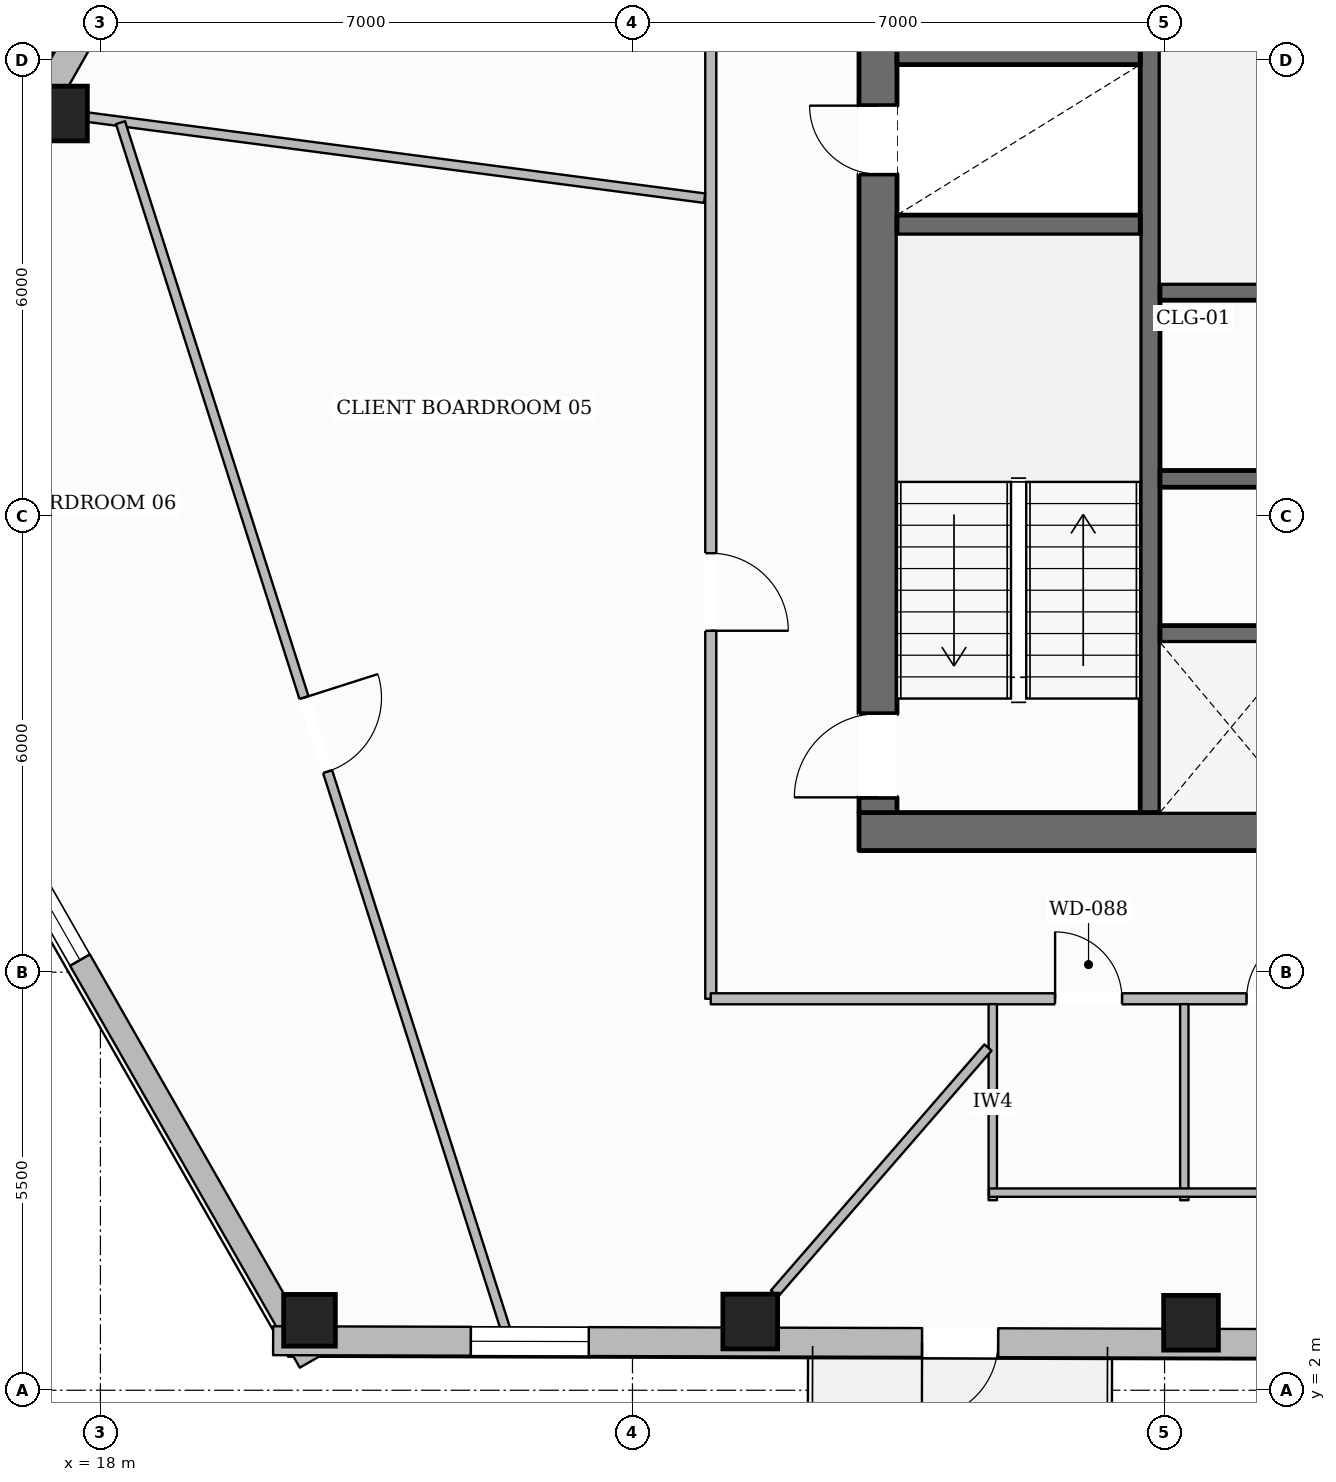
"""IFC4 building model, lengths in metres.
Left out: names, types, materials, properties, quantities, classifications, styles, units other than length and angle.
Written with IfcOpenShell. Run it as: python <this file> out.ifc"""

import sys

from ifc_helpers import new_model, si_unit, direction, frame, frame_2d, origin, origin_2d, place, context, subcontext, project, spatial, rectangle, hollow_rectangle, extrude, element, fill, save


model = new_model("IFC4")
c1 = context("Model", 3, precision=1e-05, world=origin(), true_north=direction((0.0, 1.0)))
c2 = subcontext(c1, "Body", "Model", "MODEL_VIEW")
j1 = project(units=[si_unit("LENGTHUNIT", "METRE"), si_unit("PLANEANGLEUNIT", "RADIAN")], contexts=[c1])
p1 = place(None, origin())
s1 = spatial("IfcSite", under=j1, at=p1, CompositionType="ELEMENT")
p2 = place(p1, origin())
s2 = spatial("IfcBuilding", under=s1, at=p2, CompositionType="ELEMENT")
p3 = place(p2, frame((0.0, 0.0, 97.05)))
s3 = spatial("IfcBuildingStorey", under=s2, at=p3, CompositionType="ELEMENT", Elevation=97.05)
p4 = place(p3, frame((27.98, 9.35, 0.0), z_axis=(0.0, 0.0, 1.0), x_axis=(1.0, 0.0, 0.0)))
e1 = element("IfcWall", 1, at=p4, inside=s3, PredefinedType="SOLIDWALL", context=c2, shape_type="SweptSolid", body=[
    extrude(rectangle(XDim=20.04, YDim=0.5, at=frame_2d((10.02, 0.0))), origin(), (0.0, 0.0, 1.0), 3.6),
])
p5 = place(p4, frame((10.52, 0.0, 0.0)))
e2 = element("IfcOpeningElement", 2, at=p5, cuts=e1, PredefinedType="OPENING", context=c2, shape_type="SweptSolid", body=[
    extrude(rectangle(XDim=1.4, YDim=2.2, at=frame_2d((0.7, 1.1))), frame((0.0, 0.26, 0.0), z_axis=(0.0, -1.0, 0.0), x_axis=(1.0, 0.0, 0.0)), (0.0, 0.0, 1.0), 0.52),
])
p6 = place(p3, frame((28.23, 9.6, 0.0), z_axis=(0.0, 0.0, 1.0), x_axis=(0.0, 1.0, 0.0)))
e3 = element("IfcWall", 3, at=p6, inside=s3, PredefinedType="SOLIDWALL", context=c2, shape_type="SweptSolid", body=[
    extrude(rectangle(XDim=13.0, YDim=0.5, at=frame_2d((6.5, 0.0))), origin(), (0.0, 0.0, 1.0), 3.6),
])
p7 = place(p6, frame((0.2, 0.0, 0.0)))
e4 = element("IfcOpeningElement", 4, at=p7, cuts=e3, PredefinedType="OPENING", context=c2, shape_type="SweptSolid", body=[
    extrude(rectangle(XDim=1.1, YDim=2.15, at=frame_2d((0.55, 1.075))), frame((0.0, 0.26, 0.0), z_axis=(0.0, -1.0, 0.0), x_axis=(1.0, 0.0, 0.0)), (0.0, 0.0, 1.0), 0.52),
])
p8 = place(p6, frame((8.4, 0.0, 0.0)))
e5 = element("IfcOpeningElement", 5, at=p8, cuts=e3, PredefinedType="OPENING", context=c2, shape_type="SweptSolid", body=[
    extrude(rectangle(XDim=0.9, YDim=2.1, at=frame_2d((0.45, 1.05))), frame((0.0, 0.26, 0.0), z_axis=(0.0, -1.0, 0.0), x_axis=(1.0, 0.0, 0.0)), (0.0, 0.0, 1.0), 0.52),
])
p9 = place(p3, frame((31.81, 9.6, 0.0), z_axis=(0.0, 0.0, 1.0), x_axis=(0.0, 1.0, 0.0)))
e6 = element("IfcWall", 6, at=p9, inside=s3, PredefinedType="SHEAR", context=c2, shape_type="SweptSolid", body=[
    extrude(rectangle(XDim=13.0, YDim=0.26, at=frame_2d((6.5, 0.0))), origin(), (0.0, 0.0, 1.0), 3.6),
])
p10 = place(p9, frame((10.925, 0.0, 0.0)))
e7 = element("IfcOpeningElement", 7, at=p10, cuts=e6, PredefinedType="OPENING", context=c2, shape_type="SweptSolid", body=[
    extrude(rectangle(XDim=1.25, YDim=2.25, at=frame_2d((0.625, 1.125))), frame((0.0, 0.14, 0.0), z_axis=(0.0, -1.0, 0.0), x_axis=(1.0, 0.0, 0.0)), (0.0, 0.0, 1.0), 0.28),
])
for number, where, z_axis, x_axis in (
    (8, (28.48, 17.33, 0.0), (0.0, 0.0, 1.0), (1.0, 0.0, 0.0)),
    (9, (28.48, 19.57, 0.0), (0.0, 0.0, 1.0), (1.0, 0.0, 0.0)),
):
    element("IfcWall", number, at=place(p3, frame(where, z_axis=z_axis, x_axis=x_axis)), inside=s3, PredefinedType="SHEAR", context=c2, shape_type="SweptSolid", body=[
        extrude(rectangle(XDim=3.2, YDim=0.26, at=frame_2d((1.6, 0.0))), origin(), (0.0, 0.0, 1.0), 3.6),
    ])
p11 = place(p3, frame((31.94, 16.45, 0.0), z_axis=(0.0, 0.0, 1.0), x_axis=(1.0, 0.0, 0.0)))
e10 = element("IfcWall", 10, at=p11, inside=s3, PredefinedType="SOLIDWALL", context=c2, shape_type="SweptSolid", body=[
    extrude(rectangle(XDim=12.12, YDim=0.22, at=frame_2d((6.06, 0.0))), origin(), (0.0, 0.0, 1.0), 3.6),
])
p12 = place(p3, frame((31.94, 13.99, 0.0), z_axis=(0.0, 0.0, 1.0), x_axis=(1.0, 0.0, 0.0)))
e11 = element("IfcWall", 11, at=p12, inside=s3, PredefinedType="SOLIDWALL", context=c2, shape_type="SweptSolid", body=[
    extrude(rectangle(XDim=12.12, YDim=0.22, at=frame_2d((6.06, 0.0))), origin(), (0.0, 0.0, 1.0), 3.6),
])
p13 = place(p12, frame((2.51, 0.0, 0.0)))
e12 = element("IfcOpeningElement", 12, at=p13, cuts=e11, PredefinedType="OPENING", context=c2, shape_type="SweptSolid", body=[
    extrude(rectangle(XDim=0.9, YDim=2.1, at=frame_2d((0.45, 1.05))), frame((0.0, 0.12, 0.0), z_axis=(0.0, -1.0, 0.0), x_axis=(1.0, 0.0, 0.0)), (0.0, 0.0, 1.0), 0.24),
])
p14 = place(p12, frame((6.535, 0.0, 0.0)))
e13 = element("IfcOpeningElement", 13, at=p14, cuts=e11, PredefinedType="OPENING", context=c2, shape_type="SweptSolid", body=[
    extrude(rectangle(XDim=1.1, YDim=2.2, at=frame_2d((0.55, 1.1))), frame((0.0, 0.12, 0.0), z_axis=(0.0, -1.0, 0.0), x_axis=(1.0, 0.0, 0.0)), (0.0, 0.0, 1.0), 0.24),
])
p15 = place(p12, frame((8.585, 0.0, 0.0)))
e14 = element("IfcOpeningElement", 14, at=p15, cuts=e11, PredefinedType="OPENING", context=c2, shape_type="SweptSolid", body=[
    extrude(rectangle(XDim=1.1, YDim=2.2, at=frame_2d((0.55, 1.1))), frame((0.0, 0.12, 0.0), z_axis=(0.0, -1.0, 0.0), x_axis=(1.0, 0.0, 0.0)), (0.0, 0.0, 1.0), 0.24),
])
p16 = place(p12, frame((10.635, 0.0, 0.0)))
e15 = element("IfcOpeningElement", 15, at=p16, cuts=e11, PredefinedType="OPENING", context=c2, shape_type="SweptSolid", body=[
    extrude(rectangle(XDim=1.1, YDim=2.2, at=frame_2d((0.55, 1.1))), frame((0.0, 0.12, 0.0), z_axis=(0.0, -1.0, 0.0), x_axis=(1.0, 0.0, 0.0)), (0.0, 0.0, 1.0), 0.24),
])
p17 = place(p3, frame((31.94, 11.95, 0.0), z_axis=(0.0, 0.0, 1.0), x_axis=(1.0, 0.0, 0.0)))
e16 = element("IfcWall", 16, at=p17, inside=s3, PredefinedType="SOLIDWALL", context=c2, shape_type="SweptSolid", body=[
    extrude(rectangle(XDim=6.19, YDim=0.22, at=frame_2d((3.095, 0.0))), origin(), (0.0, 0.0, 1.0), 3.6),
])
p18 = place(p3, frame((17.468, 18.796, 0.0), z_axis=(0.0, 0.0, 1.0), x_axis=(1.0, 0.0, 0.0)))
e17 = element("IfcColumn", 17, at=p18, inside=s3, PredefinedType="COLUMN", context=c2, shape_type="SweptSolid", body=[
    extrude(hollow_rectangle(XDim=0.72, YDim=0.72, WallThickness=0.032, at=origin_2d()), origin(), (0.0, 0.0, 1.0), 3.6),
])
p19 = place(p3, frame((20.751, 2.92, 0.0), z_axis=(0.0, 0.0, 1.0), x_axis=(1.0, 0.0, 0.0)))
e18 = element("IfcColumn", 18, at=p19, inside=s3, PredefinedType="COLUMN", context=c2, shape_type="SweptSolid", body=[
    extrude(hollow_rectangle(XDim=0.68, YDim=0.68, WallThickness=0.03, at=origin_2d()), origin(), (0.0, 0.0, 1.0), 3.6),
])
for number, where, z_axis, x_axis in (
    (19, (26.55, 2.904, 0.0), (0.0, 0.0, 1.0), (1.0, 0.0, 0.0)),
    (20, (32.348, 2.888, 0.0), (0.0, 0.0, 1.0), (1.0, 0.0, 0.0)),
):
    element("IfcColumn", number, at=place(p3, frame(where, z_axis=z_axis, x_axis=x_axis)), inside=s3, PredefinedType="COLUMN", context=c2, shape_type="SweptSolid", body=[
        extrude(hollow_rectangle(XDim=0.72, YDim=0.72, WallThickness=0.032, at=origin_2d()), origin(), (0.0, 0.0, 1.0), 3.6),
    ])
p20 = place(p3, frame((14.113, 13.436, 0.0), z_axis=(0.0, 0.0, 1.0), x_axis=(0.493785476093, 0.869583753068, 0.0)))
e21 = element("IfcWall", 21, at=p20, inside=s3, PredefinedType="STANDARD", context=c2, shape_type="SweptSolid", body=[
    extrude(rectangle(XDim=36.023, YDim=0.38, at=frame_2d((18.011, 0.0))), origin(), (0.0, 0.0, 1.0), 3.059),
])
p21 = place(p20, frame((26.417, 0.0, 0.0)))
e22 = element("IfcOpeningElement", 22, at=p21, cuts=e21, PredefinedType="OPENING", context=c2, shape_type="SweptSolid", body=[
    extrude(rectangle(XDim=1.0, YDim=2.2, at=frame_2d((0.5, 1.1))), frame((0.0, 0.2, 0.0), z_axis=(0.0, -1.0, 0.0), x_axis=(1.0, 0.0, 0.0)), (0.0, 0.0, 1.0), 0.4),
])
p22 = place(p20, frame((31.845, 0.0, 0.65)))
e23 = element("IfcOpeningElement", 23, at=p22, cuts=e21, PredefinedType="OPENING", context=c2, shape_type="SweptSolid", body=[
    extrude(rectangle(XDim=1.55, YDim=1.75, at=frame_2d((0.775, 0.875))), frame((0.0, 0.2, 0.0), z_axis=(0.0, -1.0, 0.0), x_axis=(1.0, 0.0, 0.0)), (0.0, 0.0, 1.0), 0.4),
])
p23 = place(p20, frame((20.156, 0.0, 0.65)))
e24 = element("IfcOpeningElement", 24, at=p23, cuts=e21, PredefinedType="OPENING", context=c2, shape_type="SweptSolid", body=[
    extrude(rectangle(XDim=1.55, YDim=1.75, at=frame_2d((0.775, 0.875))), frame((0.0, 0.2, 0.0), z_axis=(0.0, -1.0, 0.0), x_axis=(1.0, 0.0, 0.0)), (0.0, 0.0, 1.0), 0.4),
])
p24 = place(p20, frame((8.466, 0.0, 0.65)))
e25 = element("IfcOpeningElement", 25, at=p24, cuts=e21, PredefinedType="OPENING", context=c2, shape_type="SweptSolid", body=[
    extrude(rectangle(XDim=1.55, YDim=1.75, at=frame_2d((0.775, 0.875))), frame((0.0, 0.2, 0.0), z_axis=(0.0, -1.0, 0.0), x_axis=(1.0, 0.0, 0.0)), (0.0, 0.0, 1.0), 0.4),
])
p25 = place(p20, frame((2.621, 0.0, 0.65)))
e26 = element("IfcOpeningElement", 26, at=p25, cuts=e21, PredefinedType="OPENING", context=c2, shape_type="SweptSolid", body=[
    extrude(rectangle(XDim=1.55, YDim=1.75, at=frame_2d((0.775, 0.875))), frame((0.0, 0.2, 0.0), z_axis=(0.0, -1.0, 0.0), x_axis=(1.0, 0.0, 0.0)), (0.0, 0.0, 1.0), 0.4),
])
p26 = place(p3, frame((20.753, 2.372, 0.0), z_axis=(0.0, 0.0, 1.0), x_axis=(-0.496215555128, 0.868199356628, 0.0)))
e27 = element("IfcWall", 27, at=p26, inside=s3, PredefinedType="STANDARD", context=c2, shape_type="SweptSolid", body=[
    extrude(rectangle(XDim=13.383, YDim=0.3, at=frame_2d((6.691, 0.0))), origin(), (0.0, 0.0, 1.0), 3.059),
])
p27 = place(p26, frame((6.092, 0.0, 0.65)))
e28 = element("IfcOpeningElement", 28, at=p27, cuts=e27, PredefinedType="OPENING", context=c2, shape_type="SweptSolid", body=[
    extrude(rectangle(XDim=1.2, YDim=1.7, at=frame_2d((0.6, 0.85))), frame((0.0, 0.16, 0.0), z_axis=(0.0, -1.0, 0.0), x_axis=(1.0, 0.0, 0.0)), (0.0, 0.0, 1.0), 0.32),
])
p28 = place(p3, frame((56.023, 2.552, 0.0), z_axis=(0.0, 0.0, 1.0), x_axis=(-0.999996099517, 0.002793018142, 0.0)))
e29 = element("IfcWall", 29, at=p28, inside=s3, PredefinedType="STANDARD", context=c2, shape_type="SweptSolid", body=[
    extrude(rectangle(XDim=35.751, YDim=0.38, at=frame_2d((17.875, 0.0))), origin(), (0.0, 0.0, 1.0), 3.059),
])
p29 = place(p28, frame((26.213, 0.0, 0.0)))
e30 = element("IfcOpeningElement", 30, at=p29, cuts=e29, PredefinedType="OPENING", context=c2, shape_type="SweptSolid", body=[
    extrude(rectangle(XDim=1.0, YDim=2.2, at=frame_2d((0.5, 1.1))), frame((0.0, 0.2, 0.0), z_axis=(0.0, -1.0, 0.0), x_axis=(1.0, 0.0, 0.0)), (0.0, 0.0, 1.0), 0.4),
])
p30 = place(p28, frame((31.599, 0.0, 0.65)))
e31 = element("IfcOpeningElement", 31, at=p30, cuts=e29, PredefinedType="OPENING", context=c2, shape_type="SweptSolid", body=[
    extrude(rectangle(XDim=1.55, YDim=1.75, at=frame_2d((0.775, 0.875))), frame((0.0, 0.2, 0.0), z_axis=(0.0, -1.0, 0.0), x_axis=(1.0, 0.0, 0.0)), (0.0, 0.0, 1.0), 0.4),
])
p31 = place(p28, frame((20.001, 0.0, 0.65)))
e32 = element("IfcOpeningElement", 32, at=p31, cuts=e29, PredefinedType="OPENING", context=c2, shape_type="SweptSolid", body=[
    extrude(rectangle(XDim=1.55, YDim=1.75, at=frame_2d((0.775, 0.875))), frame((0.0, 0.2, 0.0), z_axis=(0.0, -1.0, 0.0), x_axis=(1.0, 0.0, 0.0)), (0.0, 0.0, 1.0), 0.4),
])
p32 = place(p28, frame((8.404, 0.0, 0.65)))
e33 = element("IfcOpeningElement", 33, at=p32, cuts=e29, PredefinedType="OPENING", context=c2, shape_type="SweptSolid", body=[
    extrude(rectangle(XDim=1.55, YDim=1.75, at=frame_2d((0.775, 0.875))), frame((0.0, 0.2, 0.0), z_axis=(0.0, -1.0, 0.0), x_axis=(1.0, 0.0, 0.0)), (0.0, 0.0, 1.0), 0.4),
])
p33 = place(p28, frame((2.605, 0.0, 0.65)))
e34 = element("IfcOpeningElement", 34, at=p33, cuts=e29, PredefinedType="OPENING", context=c2, shape_type="SweptSolid", body=[
    extrude(rectangle(XDim=1.55, YDim=1.75, at=frame_2d((0.775, 0.875))), frame((0.0, 0.2, 0.0), z_axis=(0.0, -1.0, 0.0), x_axis=(1.0, 0.0, 0.0)), (0.0, 0.0, 1.0), 0.4),
])
p34 = place(p3, frame((26.03, 25.05, 0.0), z_axis=(0.0, 0.0, 1.0), x_axis=(0.0, -1.0, 0.0)))
e35 = element("IfcWall", 35, at=p34, inside=s3, PredefinedType="PARTITIONING", context=c2, shape_type="SweptSolid", body=[
    extrude(rectangle(XDim=17.9, YDim=0.145, at=frame_2d((8.95, 0.0))), origin(), (0.0, 0.0, 1.0), 3.288),
])
p35 = place(p34, frame((3.259, 0.0, 0.0)))
e36 = element("IfcOpeningElement", 36, at=p35, cuts=e35, PredefinedType="OPENING", context=c2, shape_type="SweptSolid", body=[
    extrude(rectangle(XDim=1.02, YDim=2.15, at=frame_2d((0.51, 1.075))), frame((0.0, 0.083, 0.0), z_axis=(0.0, -1.0, 0.0), x_axis=(1.0, 0.0, 0.0)), (0.0, 0.0, 1.0), 0.165),
])
p36 = place(p34, frame((12.038, 0.0, 0.0)))
e37 = element("IfcOpeningElement", 37, at=p36, cuts=e35, PredefinedType="OPENING", context=c2, shape_type="SweptSolid", body=[
    extrude(rectangle(XDim=1.02, YDim=2.15, at=frame_2d((0.51, 1.075))), frame((0.0, 0.083, 0.0), z_axis=(0.0, -1.0, 0.0), x_axis=(1.0, 0.0, 0.0)), (0.0, 0.0, 1.0), 0.165),
])
p37 = place(p3, frame((26.03, 7.15, 0.0), z_axis=(0.0, 0.0, 1.0), x_axis=(1.0, 0.0, 0.0)))
e38 = element("IfcWall", 38, at=p37, inside=s3, PredefinedType="PARTITIONING", context=c2, shape_type="SweptSolid", body=[
    extrude(rectangle(XDim=23.94, YDim=0.145, at=frame_2d((11.97, 0.0))), origin(), (0.0, 0.0, 1.0), 3.6),
])
p38 = place(p37, frame((4.53, 0.0, 0.0)))
e39 = element("IfcOpeningElement", 39, at=p38, cuts=e38, PredefinedType="OPENING", context=c2, shape_type="SweptSolid", body=[
    extrude(rectangle(XDim=0.88, YDim=2.1, at=frame_2d((0.44, 1.05))), frame((0.0, 0.083, 0.0), z_axis=(0.0, -1.0, 0.0), x_axis=(1.0, 0.0, 0.0)), (0.0, 0.0, 1.0), 0.165),
])
p39 = place(p37, frame((7.05, 0.0, 0.0)))
e40 = element("IfcOpeningElement", 40, at=p39, cuts=e38, PredefinedType="OPENING", context=c2, shape_type="SweptSolid", body=[
    extrude(rectangle(XDim=0.88, YDim=2.1, at=frame_2d((0.44, 1.05))), frame((0.0, 0.083, 0.0), z_axis=(0.0, -1.0, 0.0), x_axis=(1.0, 0.0, 0.0)), (0.0, 0.0, 1.0), 0.165),
])
p40 = place(p37, frame((9.43, 0.0, 0.0)))
e41 = element("IfcOpeningElement", 41, at=p40, cuts=e38, PredefinedType="OPENING", context=c2, shape_type="SweptSolid", body=[
    extrude(rectangle(XDim=0.96, YDim=2.1, at=frame_2d((0.48, 1.05))), frame((0.0, 0.083, 0.0), z_axis=(0.0, -1.0, 0.0), x_axis=(1.0, 0.0, 0.0)), (0.0, 0.0, 1.0), 0.165),
])
p41 = place(p3, frame((29.74, 4.5, 0.0), z_axis=(0.0, 0.0, 1.0), x_axis=(0.0, 1.0, 0.0)))
e42 = element("IfcWall", 42, at=p41, inside=s3, PredefinedType="PLUMBINGWALL", context=c2, shape_type="SweptSolid", body=[
    extrude(rectangle(XDim=2.58, YDim=0.11, at=frame_2d((1.29, 0.0))), origin(), (0.0, 0.0, 1.0), 3.6),
])
p42 = place(p3, frame((32.26, 4.5, 0.0), z_axis=(0.0, 0.0, 1.0), x_axis=(0.0, 1.0, 0.0)))
e43 = element("IfcWall", 43, at=p42, inside=s3, PredefinedType="PLUMBINGWALL", context=c2, shape_type="SweptSolid", body=[
    extrude(rectangle(XDim=2.58, YDim=0.11, at=frame_2d((1.29, 0.0))), origin(), (0.0, 0.0, 1.0), 3.141),
])
p43 = place(p3, frame((29.69, 4.6, 0.0), z_axis=(0.0, 0.0, 1.0), x_axis=(1.0, 0.0, 0.0)))
e44 = element("IfcWall", 44, at=p43, inside=s3, PredefinedType="PLUMBINGWALL", context=c2, shape_type="SweptSolid", body=[
    extrude(rectangle(XDim=7.46, YDim=0.11, at=frame_2d((3.73, 0.0))), origin(), (0.0, 0.0, 1.0), 3.6),
])
p44 = place(p3, frame((25.949, 17.683, 0.0), z_axis=(0.0, 0.0, 1.0), x_axis=(-0.991488077313, 0.130197513598, 0.0)))
e45 = element("IfcWall", 45, at=p44, inside=s3, PredefinedType="PARTITIONING", context=c2, shape_type="SweptSolid", body=[
    extrude(rectangle(XDim=8.183, YDim=0.125, at=frame_2d((4.092, 0.0))), origin(), (0.0, 0.0, 1.0), 3.141),
])
p45 = place(p3, frame((29.677, 6.508, 0.0), z_axis=(0.0, 0.0, 1.0), x_axis=(-0.655396820037, -0.755284720013, 0.0)))
e46 = element("IfcWall", 46, at=p45, inside=s3, PredefinedType="PARTITIONING", context=c2, shape_type="SweptSolid", body=[
    extrude(rectangle(XDim=4.285, YDim=0.125, at=frame_2d((2.142, 0.0))), origin(), (0.0, 0.0, 1.0), 3.6),
])
p46 = place(p3, frame((18.264, 18.677, 0.0), z_axis=(0.0, 0.0, 1.0), x_axis=(0.303993518428, -0.95267409997, 0.0)))
e47 = element("IfcWall", 47, at=p46, inside=s3, PredefinedType="PARTITIONING", context=c2, shape_type="SweptSolid", body=[
    extrude(rectangle(XDim=16.673, YDim=0.125, at=frame_2d((8.336, 0.0))), origin(), (0.0, 0.0, 1.0), 3.288),
])
p47 = place(p46, frame((7.941, 0.0, 0.0)))
e48 = element("IfcOpeningElement", 48, at=p47, cuts=e47, PredefinedType="OPENING", context=c2, shape_type="SweptSolid", body=[
    extrude(rectangle(XDim=1.02, YDim=2.15, at=frame_2d((0.51, 1.075))), frame((0.0, 0.073, 0.0), z_axis=(0.0, -1.0, 0.0), x_axis=(1.0, 0.0, 0.0)), (0.0, 0.0, 1.0), 0.145),
])
p48 = place(p29, origin())
e49 = element("IfcDoor", 49, at=p48, inside=s3, OperationType="SINGLE_SWING_RIGHT", PredefinedType="DOOR", context=c2, shape_type="SweptSolid", body=[
    extrude(rectangle(XDim=1.0, YDim=2.2, at=frame_2d((0.5, 1.1))), frame((0.0, 0.025, 0.0), z_axis=(0.0, -1.0, 0.0), x_axis=(1.0, 0.0, 0.0)), (0.0, 0.0, 1.0), 0.05),
])
fill(e30, e49)
p49 = place(p30, origin())
e50 = element("IfcWindow", 50, at=p49, inside=s3, PartitioningType="SINGLE_PANEL", PredefinedType="WINDOW", context=c2, shape_type="SweptSolid", body=[
    extrude(rectangle(XDim=1.55, YDim=1.75, at=frame_2d((0.775, 0.875))), frame((0.0, 0.03, 0.0), z_axis=(0.0, -1.0, 0.0), x_axis=(1.0, 0.0, 0.0)), (0.0, 0.0, 1.0), 0.06),
])
fill(e31, e50)
p50 = place(p27, origin())
e51 = element("IfcWindow", 51, at=p50, inside=s3, PartitioningType="SINGLE_PANEL", PredefinedType="WINDOW", context=c2, shape_type="SweptSolid", body=[
    extrude(rectangle(XDim=1.2, YDim=1.7, at=frame_2d((0.6, 0.85))), frame((0.0, 0.03, 0.0), z_axis=(0.0, -1.0, 0.0), x_axis=(1.0, 0.0, 0.0)), (0.0, 0.0, 1.0), 0.06),
])
fill(e28, e51)
p51 = place(p7, origin())
e52 = element("IfcDoor", 52, at=p51, inside=s3, OperationType="SINGLE_SWING_LEFT", PredefinedType="DOOR", context=c2, shape_type="SweptSolid", body=[
    extrude(rectangle(XDim=1.1, YDim=2.15, at=frame_2d((0.55, 1.075))), frame((0.0, 0.025, 0.0), z_axis=(0.0, -1.0, 0.0), x_axis=(1.0, 0.0, 0.0)), (0.0, 0.0, 1.0), 0.05),
])
fill(e4, e52)
p52 = place(p8, origin())
e53 = element("IfcDoor", 53, at=p52, inside=s3, OperationType="SINGLE_SWING_RIGHT", PredefinedType="DOOR", context=c2, shape_type="SweptSolid", body=[
    extrude(rectangle(XDim=0.9, YDim=2.1, at=frame_2d((0.45, 1.05))), frame((0.0, 0.025, 0.0), z_axis=(0.0, -1.0, 0.0), x_axis=(1.0, 0.0, 0.0)), (0.0, 0.0, 1.0), 0.05),
])
fill(e5, e53)
p53 = place(p38, origin())
e54 = element("IfcDoor", 54, at=p53, inside=s3, OperationType="SINGLE_SWING_LEFT", PredefinedType="DOOR", context=c2, shape_type="SweptSolid", body=[
    extrude(rectangle(XDim=0.88, YDim=2.1, at=frame_2d((0.44, 1.05))), frame((0.0, 0.025, 0.0), z_axis=(0.0, -1.0, 0.0), x_axis=(1.0, 0.0, 0.0)), (0.0, 0.0, 1.0), 0.05),
])
fill(e39, e54)
p54 = place(p39, origin())
e55 = element("IfcDoor", 55, at=p54, inside=s3, OperationType="SINGLE_SWING_RIGHT", PredefinedType="DOOR", context=c2, shape_type="SweptSolid", body=[
    extrude(rectangle(XDim=0.88, YDim=2.1, at=frame_2d((0.44, 1.05))), frame((0.0, 0.025, 0.0), z_axis=(0.0, -1.0, 0.0), x_axis=(1.0, 0.0, 0.0)), (0.0, 0.0, 1.0), 0.05),
])
fill(e40, e55)
p55 = place(p36, origin())
e56 = element("IfcDoor", 56, at=p55, inside=s3, OperationType="SINGLE_SWING_RIGHT", PredefinedType="DOOR", context=c2, shape_type="SweptSolid", body=[
    extrude(rectangle(XDim=1.02, YDim=2.15, at=frame_2d((0.51, 1.075))), frame((0.0, 0.025, 0.0), z_axis=(0.0, -1.0, 0.0), x_axis=(1.0, 0.0, 0.0)), (0.0, 0.0, 1.0), 0.05),
])
fill(e37, e56)
p56 = place(p47, origin())
e57 = element("IfcDoor", 57, at=p56, inside=s3, OperationType="SINGLE_SWING_LEFT", PredefinedType="DOOR", context=c2, shape_type="SweptSolid", body=[
    extrude(rectangle(XDim=1.02, YDim=2.15, at=frame_2d((0.51, 1.075))), frame((0.0, 0.025, 0.0), z_axis=(0.0, -1.0, 0.0), x_axis=(1.0, 0.0, 0.0)), (0.0, 0.0, 1.0), 0.05),
])
fill(e48, e57)
save(model, sys.argv[1])
